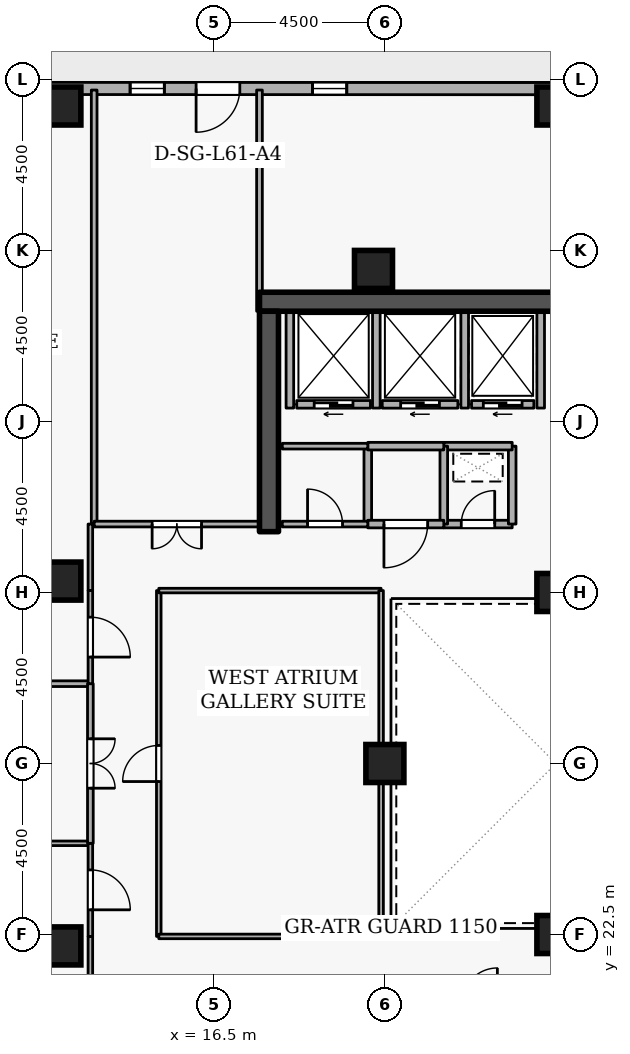
"""IFC4 building model, lengths in metres.
Left out: names, types, materials, properties, quantities, classifications, styles, units other than length and angle.
Written with IfcOpenShell. Run it as: python <this file> out.ifc"""

import sys

from ifc_helpers import new_model, si_unit, direction, frame, frame_2d, origin, origin_2d, place, context, subcontext, project, spatial, rectangle, extrude, element, fill, save


model = new_model("IFC4")
c1 = context("Model", 3, precision=1e-05, world=origin(), true_north=direction((0.0, 1.0)))
c2 = subcontext(c1, "Body", "Model", "MODEL_VIEW")
j1 = project(units=[si_unit("LENGTHUNIT", "METRE"), si_unit("PLANEANGLEUNIT", "RADIAN")], contexts=[c1])
p1 = place(None, origin())
s1 = spatial("IfcSite", under=j1, at=p1, CompositionType="ELEMENT")
p2 = place(p1, origin())
s2 = spatial("IfcBuilding", under=s1, at=p2, CompositionType="ELEMENT")
p3 = place(p2, frame((0.0, 0.0, 229.5)))
s3 = spatial("IfcBuildingStorey", under=s2, at=p3, CompositionType="ELEMENT", Elevation=229.5)
p4 = place(p3, frame((17.7, 39.15, 0.0), z_axis=(0.0, 0.0, 1.0), x_axis=(1.0, 0.0, 0.0)))
e1 = element("IfcWall", 1, at=p4, inside=s3, PredefinedType="SHEAR", context=c2, shape_type="SweptSolid", body=[
    extrude(rectangle(XDim=15.6, YDim=0.5, at=frame_2d((7.8, 0.0))), origin(), (0.0, 0.0, 1.0), 3.6),
])
p5 = place(p3, frame((17.95, 33.1, 0.0), z_axis=(0.0, 0.0, 1.0), x_axis=(0.0, 1.0, 0.0)))
e2 = element("IfcWall", 2, at=p5, inside=s3, PredefinedType="SHEAR", context=c2, shape_type="SweptSolid", body=[
    extrude(rectangle(XDim=5.8, YDim=0.5, at=frame_2d((2.9, 0.0))), origin(), (0.0, 0.0, 1.0), 3.6),
])
for number, where, z_axis, x_axis in (
    (3, (12.5, 44.3, 0.0), (0.0, 0.0, 1.0), (1.0, 0.0, 0.0)),
    (4, (25.5, 44.3, 0.0), (0.0, 0.0, 1.0), (1.0, 0.0, 0.0)),
    (5, (12.5, 22.2, 0.0), (0.0, 0.0, 1.0), (1.0, 0.0, 0.0)),
    (6, (12.5, 31.8, 0.0), (0.0, 0.0, 1.0), (1.0, 0.0, 0.0)),
    (7, (20.7, 40.0, 0.0), (0.0, 0.0, 1.0), (1.0, 0.0, 0.0)),
    (8, (25.5, 22.5, 0.0), (0.0, 0.0, 1.0), (1.0, 0.0, 0.0)),
    (9, (25.5, 31.5, 0.0), (0.0, 0.0, 1.0), (1.0, 0.0, 0.0)),
    (10, (21.0, 27.0, 0.0), (0.0, 0.0, 1.0), (1.0, 0.0, 0.0)),
):
    element("IfcColumn", number, at=place(p3, frame(where, z_axis=z_axis, x_axis=x_axis)), inside=s3, PredefinedType="COLUMN", context=c2, shape_type="SweptSolid", body=[
        extrude(rectangle(XDim=1.0, YDim=1.0, at=origin_2d()), origin(), (0.0, 0.0, 1.0), 3.6),
    ])
p6 = place(p3, frame((37.096, 44.753, 0.0), z_axis=(0.0, 0.0, 1.0), x_axis=(-0.999999933399, 0.000364968916, 0.0)))
e11 = element("IfcWall", 11, at=p6, inside=s3, PredefinedType="STANDARD", context=c2, shape_type="SweptSolid", body=[
    extrude(rectangle(XDim=32.778, YDim=0.32, at=frame_2d((16.389, 0.0))), origin(), (0.0, 0.0, 1.0), 2.7),
])
p7 = place(p6, frame((19.914, 0.0, 0.0)))
e12 = element("IfcOpeningElement", 12, at=p7, cuts=e11, PredefinedType="OPENING", context=c2, shape_type="SweptSolid", body=[
    extrude(rectangle(XDim=1.15, YDim=2.1, at=frame_2d((0.575, 1.05))), frame((0.0, 0.17, 0.0), z_axis=(0.0, -1.0, 0.0), x_axis=(1.0, 0.0, 0.0)), (0.0, 0.0, 1.0), 0.34),
])
p8 = place(p6, frame((2.7, 0.0, 0.72)))
e13 = element("IfcOpeningElement", 13, at=p8, cuts=e11, PredefinedType="OPENING", context=c2, shape_type="SweptSolid", body=[
    extrude(rectangle(XDim=0.9, YDim=1.75, at=frame_2d((0.45, 0.875))), frame((0.0, 0.17, 0.0), z_axis=(0.0, -1.0, 0.0), x_axis=(1.0, 0.0, 0.0)), (0.0, 0.0, 1.0), 0.34),
])
p9 = place(p6, frame((7.5, 0.0, 0.72)))
e14 = element("IfcOpeningElement", 14, at=p9, cuts=e11, PredefinedType="OPENING", context=c2, shape_type="SweptSolid", body=[
    extrude(rectangle(XDim=0.9, YDim=1.75, at=frame_2d((0.45, 0.875))), frame((0.0, 0.17, 0.0), z_axis=(0.0, -1.0, 0.0), x_axis=(1.0, 0.0, 0.0)), (0.0, 0.0, 1.0), 0.34),
])
p10 = place(p6, frame((17.1, 0.0, 0.72)))
e15 = element("IfcOpeningElement", 15, at=p10, cuts=e11, PredefinedType="OPENING", context=c2, shape_type="SweptSolid", body=[
    extrude(rectangle(XDim=0.9, YDim=1.75, at=frame_2d((0.45, 0.875))), frame((0.0, 0.17, 0.0), z_axis=(0.0, -1.0, 0.0), x_axis=(1.0, 0.0, 0.0)), (0.0, 0.0, 1.0), 0.34),
])
p11 = place(p6, frame((21.9, 0.0, 0.72)))
e16 = element("IfcOpeningElement", 16, at=p11, cuts=e11, PredefinedType="OPENING", context=c2, shape_type="SweptSolid", body=[
    extrude(rectangle(XDim=0.9, YDim=1.75, at=frame_2d((0.45, 0.875))), frame((0.0, 0.17, 0.0), z_axis=(0.0, -1.0, 0.0), x_axis=(1.0, 0.0, 0.0)), (0.0, 0.0, 1.0), 0.34),
])
p12 = place(p6, frame((26.7, 0.0, 0.72)))
e17 = element("IfcOpeningElement", 17, at=p12, cuts=e11, PredefinedType="OPENING", context=c2, shape_type="SweptSolid", body=[
    extrude(rectangle(XDim=0.9, YDim=1.75, at=frame_2d((0.45, 0.875))), frame((0.0, 0.17, 0.0), z_axis=(0.0, -1.0, 0.0), x_axis=(1.0, 0.0, 0.0)), (0.0, 0.0, 1.0), 0.34),
])
p13 = place(p3, frame((24.92, 36.45, 0.0), z_axis=(0.0, 0.0, 1.0), x_axis=(-1.0, 0.0, 0.0)))
e18 = element("IfcWall", 18, at=p13, inside=s3, PredefinedType="STANDARD", context=c2, shape_type="SweptSolid", body=[
    extrude(rectangle(XDim=1.64, YDim=0.2, at=frame_2d((0.82, 0.0))), origin(), (0.0, 0.0, 1.0), 3.3),
])
p14 = place(p13, frame((0.31, 0.0, 0.0)))
e19 = element("IfcOpeningElement", 19, at=p14, cuts=e18, PredefinedType="OPENING", context=c2, shape_type="SweptSolid", body=[
    extrude(rectangle(XDim=1.02, YDim=2.06, at=frame_2d((0.51, 1.03))), frame((0.0, 0.11, 0.0), z_axis=(0.0, -1.0, 0.0), x_axis=(1.0, 0.0, 0.0)), (0.0, 0.0, 1.0), 0.22),
])
p15 = place(p3, frame((22.92, 36.45, 0.0), z_axis=(0.0, 0.0, 1.0), x_axis=(-1.0, 0.0, 0.0)))
e20 = element("IfcWall", 20, at=p15, inside=s3, PredefinedType="STANDARD", context=c2, shape_type="SweptSolid", body=[
    extrude(rectangle(XDim=1.99, YDim=0.2, at=frame_2d((0.995, 0.0))), origin(), (0.0, 0.0, 1.0), 3.3),
])
p16 = place(p15, frame((0.485, 0.0, 0.0)))
e21 = element("IfcOpeningElement", 21, at=p16, cuts=e20, PredefinedType="OPENING", context=c2, shape_type="SweptSolid", body=[
    extrude(rectangle(XDim=1.02, YDim=2.06, at=frame_2d((0.51, 1.03))), frame((0.0, 0.11, 0.0), z_axis=(0.0, -1.0, 0.0), x_axis=(1.0, 0.0, 0.0)), (0.0, 0.0, 1.0), 0.22),
])
p17 = place(p3, frame((20.62, 36.45, 0.0), z_axis=(0.0, 0.0, 1.0), x_axis=(-1.0, 0.0, 0.0)))
e22 = element("IfcWall", 22, at=p17, inside=s3, PredefinedType="STANDARD", context=c2, shape_type="SweptSolid", body=[
    extrude(rectangle(XDim=1.94, YDim=0.2, at=frame_2d((0.97, 0.0))), origin(), (0.0, 0.0, 1.0), 3.3),
])
p18 = place(p17, frame((0.46, 0.0, 0.0)))
e23 = element("IfcOpeningElement", 23, at=p18, cuts=e22, PredefinedType="OPENING", context=c2, shape_type="SweptSolid", body=[
    extrude(rectangle(XDim=1.02, YDim=2.06, at=frame_2d((0.51, 1.03))), frame((0.0, 0.11, 0.0), z_axis=(0.0, -1.0, 0.0), x_axis=(1.0, 0.0, 0.0)), (0.0, 0.0, 1.0), 0.22),
])
for number, where, z_axis, x_axis in (
    (24, (25.1, 36.352, 0.0), (0.0, 0.0, 1.0), (0.0, 1.0, 0.0)),
    (25, (23.1, 36.352, 0.0), (0.0, 0.0, 1.0), (0.0, 1.0, 0.0)),
    (26, (20.775, 36.352, 0.0), (0.0, 0.0, 1.0), (0.0, 1.0, 0.0)),
    (27, (18.5, 36.352, 0.0), (0.0, 0.0, 1.0), (0.0, 1.0, 0.0)),
):
    element("IfcWall", number, at=place(p3, frame(where, z_axis=z_axis, x_axis=x_axis)), inside=s3, PredefinedType="STANDARD", context=c2, shape_type="SweptSolid", body=[
        extrude(rectangle(XDim=2.536, YDim=0.2, at=frame_2d((1.268, 0.0))), origin(), (0.0, 0.0, 1.0), 3.3),
    ])
p19 = place(p3, frame((22.55, 33.3, 0.0), z_axis=(0.0, 0.0, 1.0), x_axis=(1.0, 0.0, 0.0)))
e28 = element("IfcWall", 28, at=p19, inside=s3, PredefinedType="STANDARD", context=c2, shape_type="SweptSolid", body=[
    extrude(rectangle(XDim=1.8, YDim=0.2, at=frame_2d((0.9, 0.0))), origin(), (0.0, 0.0, 1.0), 3.3),
])
p20 = place(p19, frame((0.46, 0.0, 0.0)))
e29 = element("IfcOpeningElement", 29, at=p20, cuts=e28, PredefinedType="OPENING", context=c2, shape_type="SweptSolid", body=[
    extrude(rectangle(XDim=0.88, YDim=2.04, at=frame_2d((0.44, 1.02))), frame((0.0, 0.11, 0.0), z_axis=(0.0, -1.0, 0.0), x_axis=(1.0, 0.0, 0.0)), (0.0, 0.0, 1.0), 0.22),
])
p21 = place(p3, frame((24.35, 33.3, 0.0), z_axis=(0.0, 0.0, 1.0), x_axis=(0.0, 1.0, 0.0)))
e30 = element("IfcWall", 30, at=p21, inside=s3, PredefinedType="STANDARD", context=c2, shape_type="SweptSolid", body=[
    extrude(rectangle(XDim=2.05, YDim=0.2, at=frame_2d((1.025, 0.0))), origin(), (0.0, 0.0, 1.0), 3.3),
])
p22 = place(p3, frame((24.35, 35.35, 0.0), z_axis=(0.0, 0.0, 1.0), x_axis=(-1.0, 0.0, 0.0)))
e31 = element("IfcWall", 31, at=p22, inside=s3, PredefinedType="STANDARD", context=c2, shape_type="SweptSolid", body=[
    extrude(rectangle(XDim=1.8, YDim=0.2, at=frame_2d((0.9, 0.0))), origin(), (0.0, 0.0, 1.0), 3.3),
])
for number, where, z_axis, x_axis in (
    (32, (22.55, 35.35, 0.0), (0.0, 0.0, 1.0), (0.0, -1.0, 0.0)),
    (33, (20.55, 33.3, 0.0), (0.0, 0.0, 1.0), (0.0, 1.0, 0.0)),
):
    element("IfcWall", number, at=place(p3, frame(where, z_axis=z_axis, x_axis=x_axis)), inside=s3, PredefinedType="STANDARD", context=c2, shape_type="SweptSolid", body=[
        extrude(rectangle(XDim=2.05, YDim=0.2, at=frame_2d((1.025, 0.0))), origin(), (0.0, 0.0, 1.0), 3.3),
    ])
p23 = place(p3, frame((20.55, 35.35, 0.0), z_axis=(0.0, 0.0, 1.0), x_axis=(1.0, 0.0, 0.0)))
e34 = element("IfcWall", 34, at=p23, inside=s3, PredefinedType="STANDARD", context=c2, shape_type="SweptSolid", body=[
    extrude(rectangle(XDim=2.0, YDim=0.2, at=frame_2d((1.0, 0.0))), origin(), (0.0, 0.0, 1.0), 3.3),
])
p24 = place(p3, frame((22.55, 33.3, 0.0), z_axis=(0.0, 0.0, 1.0), x_axis=(-1.0, 0.0, 0.0)))
e35 = element("IfcWall", 35, at=p24, inside=s3, PredefinedType="STANDARD", context=c2, shape_type="SweptSolid", body=[
    extrude(rectangle(XDim=2.0, YDim=0.2, at=frame_2d((1.0, 0.0))), origin(), (0.0, 0.0, 1.0), 3.3),
])
p25 = place(p24, frame((0.425, 0.0, 0.0)))
e36 = element("IfcOpeningElement", 36, at=p25, cuts=e35, PredefinedType="OPENING", context=c2, shape_type="SweptSolid", body=[
    extrude(rectangle(XDim=1.15, YDim=2.1, at=frame_2d((0.575, 1.05))), frame((0.0, 0.11, 0.0), z_axis=(0.0, -1.0, 0.0), x_axis=(1.0, 0.0, 0.0)), (0.0, 0.0, 1.0), 0.22),
])
p26 = place(p3, frame((18.3, 33.3, 0.0), z_axis=(0.0, 0.0, 1.0), x_axis=(1.0, 0.0, 0.0)))
e37 = element("IfcWall", 37, at=p26, inside=s3, PredefinedType="PARTITIONING", context=c2, shape_type="SweptSolid", body=[
    extrude(rectangle(XDim=2.25, YDim=0.15, at=frame_2d((1.125, 0.0))), origin(), (0.0, 0.0, 1.0), 3.3),
])
p27 = place(p26, frame((0.665, 0.0, 0.0)))
e38 = element("IfcOpeningElement", 38, at=p27, cuts=e37, PredefinedType="OPENING", context=c2, shape_type="SweptSolid", body=[
    extrude(rectangle(XDim=0.92, YDim=2.08, at=frame_2d((0.46, 1.04))), frame((0.0, 0.085, 0.0), z_axis=(0.0, -1.0, 0.0), x_axis=(1.0, 0.0, 0.0)), (0.0, 0.0, 1.0), 0.17),
])
p28 = place(p3, frame((20.55, 35.35, 0.0), z_axis=(0.0, 0.0, 1.0), x_axis=(-1.0, 0.0, 0.0)))
e39 = element("IfcWall", 39, at=p28, inside=s3, PredefinedType="PARTITIONING", context=c2, shape_type="SweptSolid", body=[
    extrude(rectangle(XDim=2.25, YDim=0.15, at=frame_2d((1.125, 0.0))), origin(), (0.0, 0.0, 1.0), 3.3),
])
p29 = place(p3, frame((13.35, 33.3, 0.0), z_axis=(0.0, 0.0, 1.0), x_axis=(0.0, 1.0, 0.0)))
e40 = element("IfcWall", 40, at=p29, inside=s3, PredefinedType="PARTITIONING", context=c2, shape_type="SweptSolid", body=[
    extrude(rectangle(XDim=11.42, YDim=0.15, at=frame_2d((5.71, 0.0))), origin(), (0.0, 0.0, 1.0), 3.3),
])
p30 = place(p3, frame((17.7, 44.72, 0.0), z_axis=(0.0, 0.0, 1.0), x_axis=(0.0, -1.0, 0.0)))
e41 = element("IfcWall", 41, at=p30, inside=s3, PredefinedType="PARTITIONING", context=c2, shape_type="SweptSolid", body=[
    extrude(rectangle(XDim=5.82, YDim=0.15, at=frame_2d((2.91, 0.0))), origin(), (0.0, 0.0, 1.0), 2.505),
])
p31 = place(p3, frame((17.7, 33.3, 0.0), z_axis=(0.0, 0.0, 1.0), x_axis=(-1.0, 0.0, 0.0)))
e42 = element("IfcWall", 42, at=p31, inside=s3, PredefinedType="PARTITIONING", context=c2, shape_type="SweptSolid", body=[
    extrude(rectangle(XDim=4.35, YDim=0.15, at=frame_2d((2.175, 0.0))), origin(), (0.0, 0.0, 1.0), 3.3),
])
p32 = place(p31, frame((1.525, 0.0, 0.0)))
e43 = element("IfcOpeningElement", 43, at=p32, cuts=e42, PredefinedType="OPENING", context=c2, shape_type="SweptSolid", body=[
    extrude(rectangle(XDim=1.3, YDim=2.12, at=frame_2d((0.65, 1.06))), frame((0.0, 0.085, 0.0), z_axis=(0.0, -1.0, 0.0), x_axis=(1.0, 0.0, 0.0)), (0.0, 0.0, 1.0), 0.17),
])
p33 = place(p3, frame((13.25, 22.45, 0.0), z_axis=(0.0, 0.0, 1.0), x_axis=(0.0, -1.0, 0.0)))
e44 = element("IfcWall", 44, at=p33, inside=s3, PredefinedType="PARTITIONING", context=c2, shape_type="SweptSolid", body=[
    extrude(rectangle(XDim=1.75, YDim=0.12, at=frame_2d((0.875, 0.0))), origin(), (0.0, 0.0, 1.0), 3.3),
])
p34 = place(p3, frame((1.78, 24.9, 0.0), z_axis=(0.0, 0.0, 1.0), x_axis=(1.0, 0.0, 0.0)))
e45 = element("IfcWall", 45, at=p34, inside=s3, PredefinedType="PARTITIONING", context=c2, shape_type="SweptSolid", body=[
    extrude(rectangle(XDim=11.47, YDim=0.12, at=frame_2d((5.735, 0.0))), origin(), (0.0, 0.0, 1.0), 3.3),
])
p35 = place(p3, frame((13.25, 24.9, 0.0), z_axis=(0.0, 0.0, 1.0), x_axis=(0.0, -1.0, 0.0)))
e46 = element("IfcWall", 46, at=p35, inside=s3, PredefinedType="PARTITIONING", context=c2, shape_type="SweptSolid", body=[
    extrude(rectangle(XDim=2.45, YDim=0.12, at=frame_2d((1.225, 0.0))), origin(), (0.0, 0.0, 1.0), 3.3),
])
p36 = place(p35, frame((0.7, 0.0, 0.0)))
e47 = element("IfcOpeningElement", 47, at=p36, cuts=e46, PredefinedType="OPENING", context=c2, shape_type="SweptSolid", body=[
    extrude(rectangle(XDim=1.05, YDim=2.1, at=frame_2d((0.525, 1.05))), frame((0.0, 0.07, 0.0), z_axis=(0.0, -1.0, 0.0), x_axis=(1.0, 0.0, 0.0)), (0.0, 0.0, 1.0), 0.14),
])
p37 = place(p3, frame((1.78, 29.1, 0.0), z_axis=(0.0, 0.0, 1.0), x_axis=(1.0, 0.0, 0.0)))
e48 = element("IfcWall", 48, at=p37, inside=s3, PredefinedType="PARTITIONING", context=c2, shape_type="SweptSolid", body=[
    extrude(rectangle(XDim=11.47, YDim=0.15, at=frame_2d((5.735, 0.0))), origin(), (0.0, 0.0, 1.0), 3.3),
])
p38 = place(p3, frame((13.25, 29.1, 0.0), z_axis=(0.0, 0.0, 1.0), x_axis=(0.0, -1.0, 0.0)))
e49 = element("IfcWall", 49, at=p38, inside=s3, PredefinedType="PARTITIONING", context=c2, shape_type="SweptSolid", body=[
    extrude(rectangle(XDim=4.2, YDim=0.15, at=frame_2d((2.1, 0.0))), origin(), (0.0, 0.0, 1.0), 3.3),
])
p39 = place(p38, frame((1.45, 0.0, 0.0)))
e50 = element("IfcOpeningElement", 50, at=p39, cuts=e49, PredefinedType="OPENING", context=c2, shape_type="SweptSolid", body=[
    extrude(rectangle(XDim=1.3, YDim=2.12, at=frame_2d((0.65, 1.06))), frame((0.0, 0.085, 0.0), z_axis=(0.0, -1.0, 0.0), x_axis=(1.0, 0.0, 0.0)), (0.0, 0.0, 1.0), 0.17),
])
p40 = place(p3, frame((13.25, 33.3, 0.0), z_axis=(0.0, 0.0, 1.0), x_axis=(0.0, -1.0, 0.0)))
e51 = element("IfcWall", 51, at=p40, inside=s3, PredefinedType="PARTITIONING", context=c2, shape_type="SweptSolid", body=[
    extrude(rectangle(XDim=1.75, YDim=0.12, at=frame_2d((0.875, 0.0))), origin(), (0.0, 0.0, 1.0), 3.3),
])
p41 = place(p3, frame((13.25, 31.55, 0.0), z_axis=(0.0, 0.0, 1.0), x_axis=(0.0, -1.0, 0.0)))
e52 = element("IfcWall", 52, at=p41, inside=s3, PredefinedType="PARTITIONING", context=c2, shape_type="SweptSolid", body=[
    extrude(rectangle(XDim=2.45, YDim=0.12, at=frame_2d((1.225, 0.0))), origin(), (0.0, 0.0, 1.0), 3.3),
])
p42 = place(p41, frame((0.7, 0.0, 0.0)))
e53 = element("IfcOpeningElement", 53, at=p42, cuts=e52, PredefinedType="OPENING", context=c2, shape_type="SweptSolid", body=[
    extrude(rectangle(XDim=1.05, YDim=2.1, at=frame_2d((0.525, 1.05))), frame((0.0, 0.07, 0.0), z_axis=(0.0, -1.0, 0.0), x_axis=(1.0, 0.0, 0.0)), (0.0, 0.0, 1.0), 0.14),
])
p43 = place(p3, frame((15.05, 22.45, 0.0), z_axis=(0.0, 0.0, 1.0), x_axis=(0.0, 1.0, 0.0)))
e54 = element("IfcWall", 54, at=p43, inside=s3, PredefinedType="PARTITIONING", context=c2, shape_type="SweptSolid", body=[
    extrude(rectangle(XDim=9.1, YDim=0.12, at=frame_2d((4.55, 0.0))), origin(), (0.0, 0.0, 1.0), 3.3),
])
p44 = place(p43, frame((4.075, 0.0, 0.0)))
e55 = element("IfcOpeningElement", 55, at=p44, cuts=e54, PredefinedType="OPENING", context=c2, shape_type="SweptSolid", body=[
    extrude(rectangle(XDim=0.95, YDim=2.1, at=frame_2d((0.475, 1.05))), frame((0.0, 0.07, 0.0), z_axis=(0.0, -1.0, 0.0), x_axis=(1.0, 0.0, 0.0)), (0.0, 0.0, 1.0), 0.14),
])
p45 = place(p3, frame((15.05, 31.55, 0.0), z_axis=(0.0, 0.0, 1.0), x_axis=(1.0, 0.0, 0.0)))
e56 = element("IfcWall", 56, at=p45, inside=s3, PredefinedType="PARTITIONING", context=c2, shape_type="SweptSolid", body=[
    extrude(rectangle(XDim=5.85, YDim=0.12, at=frame_2d((2.925, 0.0))), origin(), (0.0, 0.0, 1.0), 3.3),
])
p46 = place(p3, frame((20.9, 31.55, 0.0), z_axis=(0.0, 0.0, 1.0), x_axis=(0.0, -1.0, 0.0)))
e57 = element("IfcWall", 57, at=p46, inside=s3, PredefinedType="PARTITIONING", context=c2, shape_type="SweptSolid", body=[
    extrude(rectangle(XDim=9.1, YDim=0.12, at=frame_2d((4.55, 0.0))), origin(), (0.0, 0.0, 1.0), 3.3),
])
p47 = place(p3, frame((20.9, 22.45, 0.0), z_axis=(0.0, 0.0, 1.0), x_axis=(-1.0, 0.0, 0.0)))
e58 = element("IfcWall", 58, at=p47, inside=s3, PredefinedType="PARTITIONING", context=c2, shape_type="SweptSolid", body=[
    extrude(rectangle(XDim=5.85, YDim=0.12, at=frame_2d((2.925, 0.0))), origin(), (0.0, 0.0, 1.0), 3.3),
])
p48 = place(p7, origin())
e59 = element("IfcDoor", 59, at=p48, inside=s3, OperationType="SINGLE_SWING_RIGHT", PredefinedType="DOOR", context=c2, shape_type="SweptSolid", body=[
    extrude(rectangle(XDim=1.15, YDim=2.1, at=frame_2d((0.575, 1.05))), frame((0.0, 0.025, 0.0), z_axis=(0.0, -1.0, 0.0), x_axis=(1.0, 0.0, 0.0)), (0.0, 0.0, 1.0), 0.05),
])
fill(e12, e59)
p49 = place(p10, origin())
e60 = element("IfcWindow", 60, at=p49, inside=s3, PartitioningType="SINGLE_PANEL", PredefinedType="WINDOW", context=c2, shape_type="SweptSolid", body=[
    extrude(rectangle(XDim=0.9, YDim=1.75, at=frame_2d((0.45, 0.875))), frame((0.0, 0.03, 0.0), z_axis=(0.0, -1.0, 0.0), x_axis=(1.0, 0.0, 0.0)), (0.0, 0.0, 1.0), 0.06),
])
fill(e15, e60)
p50 = place(p11, origin())
e61 = element("IfcWindow", 61, at=p50, inside=s3, PartitioningType="SINGLE_PANEL", PredefinedType="WINDOW", context=c2, shape_type="SweptSolid", body=[
    extrude(rectangle(XDim=0.9, YDim=1.75, at=frame_2d((0.45, 0.875))), frame((0.0, 0.03, 0.0), z_axis=(0.0, -1.0, 0.0), x_axis=(1.0, 0.0, 0.0)), (0.0, 0.0, 1.0), 0.06),
])
fill(e16, e61)
p51 = place(p14, origin())
e62 = element("IfcDoor", 62, at=p51, inside=s3, OperationType="SLIDING_TO_LEFT", PredefinedType="DOOR", context=c2, shape_type="SweptSolid", body=[
    extrude(rectangle(XDim=1.02, YDim=2.06, at=frame_2d((0.51, 1.03))), frame((0.0, 0.025, 0.0), z_axis=(0.0, -1.0, 0.0), x_axis=(1.0, 0.0, 0.0)), (0.0, 0.0, 1.0), 0.05),
])
fill(e19, e62)
p52 = place(p16, origin())
e63 = element("IfcDoor", 63, at=p52, inside=s3, OperationType="SLIDING_TO_LEFT", PredefinedType="DOOR", context=c2, shape_type="SweptSolid", body=[
    extrude(rectangle(XDim=1.02, YDim=2.06, at=frame_2d((0.51, 1.03))), frame((0.0, 0.025, 0.0), z_axis=(0.0, -1.0, 0.0), x_axis=(1.0, 0.0, 0.0)), (0.0, 0.0, 1.0), 0.05),
])
fill(e21, e63)
p53 = place(p18, origin())
e64 = element("IfcDoor", 64, at=p53, inside=s3, OperationType="SLIDING_TO_LEFT", PredefinedType="DOOR", context=c2, shape_type="SweptSolid", body=[
    extrude(rectangle(XDim=1.02, YDim=2.06, at=frame_2d((0.51, 1.03))), frame((0.0, 0.025, 0.0), z_axis=(0.0, -1.0, 0.0), x_axis=(1.0, 0.0, 0.0)), (0.0, 0.0, 1.0), 0.05),
])
fill(e23, e64)
p54 = place(p20, origin())
e65 = element("IfcDoor", 65, at=p54, inside=s3, OperationType="SINGLE_SWING_RIGHT", PredefinedType="DOOR", context=c2, shape_type="SweptSolid", body=[
    extrude(rectangle(XDim=0.88, YDim=2.04, at=frame_2d((0.44, 1.02))), frame((0.0, 0.025, 0.0), z_axis=(0.0, -1.0, 0.0), x_axis=(1.0, 0.0, 0.0)), (0.0, 0.0, 1.0), 0.05),
])
fill(e29, e65)
p55 = place(p27, origin())
e66 = element("IfcDoor", 66, at=p55, inside=s3, OperationType="SINGLE_SWING_LEFT", PredefinedType="DOOR", context=c2, shape_type="SweptSolid", body=[
    extrude(rectangle(XDim=0.92, YDim=2.08, at=frame_2d((0.46, 1.04))), frame((0.0, 0.025, 0.0), z_axis=(0.0, -1.0, 0.0), x_axis=(1.0, 0.0, 0.0)), (0.0, 0.0, 1.0), 0.05),
])
fill(e38, e66)
p56 = place(p25, origin())
e67 = element("IfcDoor", 67, at=p56, inside=s3, OperationType="SINGLE_SWING_RIGHT", PredefinedType="DOOR", context=c2, shape_type="SweptSolid", body=[
    extrude(rectangle(XDim=1.15, YDim=2.1, at=frame_2d((0.575, 1.05))), frame((0.0, 0.025, 0.0), z_axis=(0.0, -1.0, 0.0), x_axis=(1.0, 0.0, 0.0)), (0.0, 0.0, 1.0), 0.05),
])
fill(e36, e67)
p57 = place(p32, origin())
e68 = element("IfcDoor", 68, at=p57, inside=s3, OperationType="DOUBLE_DOOR_SINGLE_SWING", PredefinedType="DOOR", context=c2, shape_type="SweptSolid", body=[
    extrude(rectangle(XDim=1.3, YDim=2.12, at=frame_2d((0.65, 1.06))), frame((0.0, 0.025, 0.0), z_axis=(0.0, -1.0, 0.0), x_axis=(1.0, 0.0, 0.0)), (0.0, 0.0, 1.0), 0.05),
])
fill(e43, e68)
p58 = place(p36, origin())
e69 = element("IfcDoor", 69, at=p58, inside=s3, OperationType="SINGLE_SWING_RIGHT", PredefinedType="DOOR", context=c2, shape_type="SweptSolid", body=[
    extrude(rectangle(XDim=1.05, YDim=2.1, at=frame_2d((0.525, 1.05))), frame((0.0, 0.025, 0.0), z_axis=(0.0, -1.0, 0.0), x_axis=(1.0, 0.0, 0.0)), (0.0, 0.0, 1.0), 0.05),
])
fill(e47, e69)
p59 = place(p39, origin())
e70 = element("IfcDoor", 70, at=p59, inside=s3, OperationType="DOUBLE_DOOR_SINGLE_SWING", PredefinedType="DOOR", context=c2, shape_type="SweptSolid", body=[
    extrude(rectangle(XDim=1.3, YDim=2.12, at=frame_2d((0.65, 1.06))), frame((0.0, 0.025, 0.0), z_axis=(0.0, -1.0, 0.0), x_axis=(1.0, 0.0, 0.0)), (0.0, 0.0, 1.0), 0.05),
])
fill(e50, e70)
p60 = place(p42, origin())
e71 = element("IfcDoor", 71, at=p60, inside=s3, OperationType="SINGLE_SWING_RIGHT", PredefinedType="DOOR", context=c2, shape_type="SweptSolid", body=[
    extrude(rectangle(XDim=1.05, YDim=2.1, at=frame_2d((0.525, 1.05))), frame((0.0, 0.025, 0.0), z_axis=(0.0, -1.0, 0.0), x_axis=(1.0, 0.0, 0.0)), (0.0, 0.0, 1.0), 0.05),
])
fill(e53, e71)
p61 = place(p44, origin())
e72 = element("IfcDoor", 72, at=p61, inside=s3, OperationType="SINGLE_SWING_LEFT", PredefinedType="DOOR", context=c2, shape_type="SweptSolid", body=[
    extrude(rectangle(XDim=0.95, YDim=2.1, at=frame_2d((0.475, 1.05))), frame((0.0, 0.025, 0.0), z_axis=(0.0, -1.0, 0.0), x_axis=(1.0, 0.0, 0.0)), (0.0, 0.0, 1.0), 0.05),
])
fill(e55, e72)
save(model, sys.argv[1])
